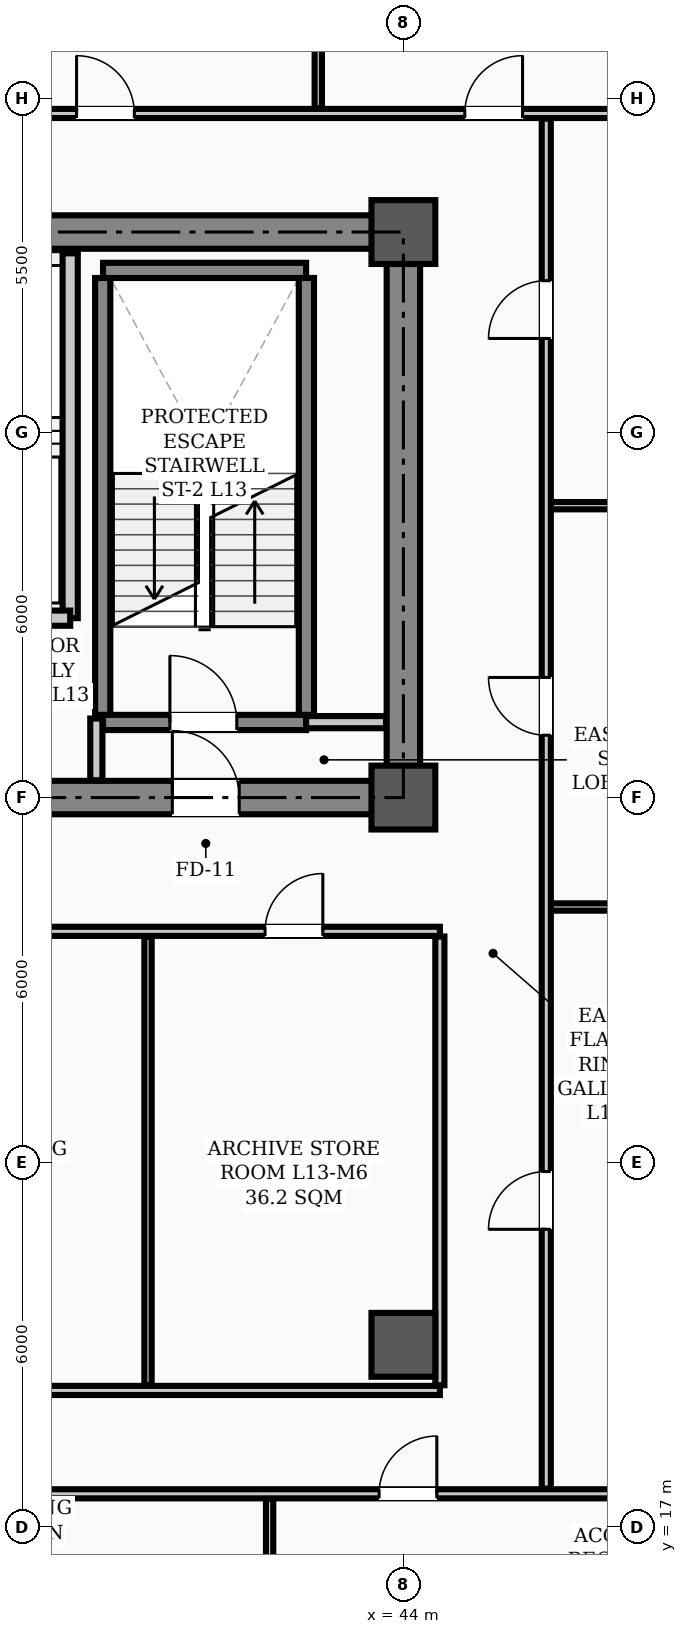
"""IFC4 building model, lengths in metres.
Left out: names, types, materials, properties, quantities, classifications, styles, units other than length and angle.
Written with IfcOpenShell. Run it as: python <this file> out.ifc"""

import sys

from ifc_helpers import new_model, si_unit, direction, frame, frame_2d, origin, origin_2d, place, context, subcontext, project, spatial, rectangle, hollow_rectangle, extrude, element, fill, save


model = new_model("IFC4")
c1 = context("Model", 3, precision=1e-05, world=origin(), true_north=direction((0.0, 1.0)))
c2 = subcontext(c1, "Body", "Model", "MODEL_VIEW")
j1 = project(units=[si_unit("LENGTHUNIT", "METRE"), si_unit("PLANEANGLEUNIT", "RADIAN")], contexts=[c1])
p1 = place(None, origin())
s1 = spatial("IfcSite", under=j1, at=p1, CompositionType="ELEMENT")
p2 = place(p1, origin())
s2 = spatial("IfcBuilding", under=s1, at=p2, CompositionType="ELEMENT")
p3 = place(p2, frame((0.0, 0.0, 53.8)))
s3 = spatial("IfcBuildingStorey", under=s2, at=p3, CompositionType="ELEMENT", Elevation=53.8)
for number, where, z_axis, x_axis in (
    (1, (44.0, 29.0, 0.0), (0.0, 0.0, 1.0), (1.0, 0.0, 0.0)),
    (2, (44.0, 38.3, 0.0), (0.0, 0.0, 1.0), (1.0, 0.0, 0.0)),
    (3, (44.0, 20.0, 0.0), (0.0, 0.0, 1.0), (1.0, 0.0, 0.0)),
):
    element("IfcColumn", number, at=place(p3, frame(where, z_axis=z_axis, x_axis=x_axis)), inside=s3, PredefinedType="COLUMN", context=c2, shape_type="SweptSolid", body=[
        extrude(hollow_rectangle(XDim=1.05, YDim=1.05, WallThickness=0.038, InnerFilletRadius=0.019, OuterFilletRadius=0.057, at=origin_2d()), origin(), (0.0, 0.0, 1.0), 3.9),
    ])
p4 = place(p3, frame((13.5, 29.0, 0.0), z_axis=(0.0, 0.0, 1.0), x_axis=(1.0, 0.0, 0.0)))
e4 = element("IfcWall", 4, at=p4, inside=s3, PredefinedType="SHEAR", context=c2, shape_type="SweptSolid", body=[
    extrude(rectangle(XDim=30.5, YDim=0.55, at=frame_2d((15.25, 0.0))), origin(), (0.0, 0.0, 1.0), 3.72),
])
p5 = place(p4, frame((1.75, 0.0, 0.0)))
e5 = element("IfcOpeningElement", 5, at=p5, cuts=e4, PredefinedType="OPENING", context=c2, shape_type="SweptSolid", body=[
    extrude(rectangle(XDim=1.1, YDim=2.08, at=frame_2d((0.55, 1.04))), frame((0.0, 0.285, 0.0), z_axis=(0.0, -1.0, 0.0), x_axis=(1.0, 0.0, 0.0)), (0.0, 0.0, 1.0), 0.57),
])
p6 = place(p4, frame((26.7, 0.0, 0.0)))
e6 = element("IfcOpeningElement", 6, at=p6, cuts=e4, PredefinedType="OPENING", context=c2, shape_type="SweptSolid", body=[
    extrude(rectangle(XDim=1.1, YDim=2.08, at=frame_2d((0.55, 1.04))), frame((0.0, 0.285, 0.0), z_axis=(0.0, -1.0, 0.0), x_axis=(1.0, 0.0, 0.0)), (0.0, 0.0, 1.0), 0.57),
])
p7 = place(p4, frame((6.8, 0.0, 0.0)))
e7 = element("IfcOpeningElement", 7, at=p7, cuts=e4, PredefinedType="OPENING", context=c2, shape_type="SweptSolid", body=[
    extrude(rectangle(XDim=1.1, YDim=2.08, at=frame_2d((0.55, 1.04))), frame((0.0, 0.285, 0.0), z_axis=(0.0, -1.0, 0.0), x_axis=(1.0, 0.0, 0.0)), (0.0, 0.0, 1.0), 0.57),
])
p8 = place(p4, frame((13.2, 0.0, 0.0)))
e8 = element("IfcOpeningElement", 8, at=p8, cuts=e4, PredefinedType="OPENING", context=c2, shape_type="SweptSolid", body=[
    extrude(rectangle(XDim=1.6, YDim=2.08, at=frame_2d((0.8, 1.04))), frame((0.0, 0.285, 0.0), z_axis=(0.0, -1.0, 0.0), x_axis=(1.0, 0.0, 0.0)), (0.0, 0.0, 1.0), 0.57),
])
p9 = place(p4, frame((19.5, 0.0, 0.0)))
e9 = element("IfcOpeningElement", 9, at=p9, cuts=e4, PredefinedType="OPENING", context=c2, shape_type="SweptSolid", body=[
    extrude(rectangle(XDim=0.9, YDim=2.08, at=frame_2d((0.45, 1.04))), frame((0.0, 0.285, 0.0), z_axis=(0.0, -1.0, 0.0), x_axis=(1.0, 0.0, 0.0)), (0.0, 0.0, 1.0), 0.57),
])
p10 = place(p4, frame((21.55, 0.0, 0.0)))
e10 = element("IfcOpeningElement", 10, at=p10, cuts=e4, PredefinedType="OPENING", context=c2, shape_type="SweptSolid", body=[
    extrude(rectangle(XDim=0.9, YDim=2.08, at=frame_2d((0.45, 1.04))), frame((0.0, 0.285, 0.0), z_axis=(0.0, -1.0, 0.0), x_axis=(1.0, 0.0, 0.0)), (0.0, 0.0, 1.0), 0.57),
])
p11 = place(p3, frame((13.5, 38.3, 0.0), z_axis=(0.0, 0.0, 1.0), x_axis=(1.0, 0.0, 0.0)))
e11 = element("IfcWall", 11, at=p11, inside=s3, PredefinedType="SHEAR", context=c2, shape_type="SweptSolid", body=[
    extrude(rectangle(XDim=30.5, YDim=0.55, at=frame_2d((15.25, 0.0))), origin(), (0.0, 0.0, 1.0), 3.72),
])
p12 = place(p3, frame((44.0, 29.35, 0.0), z_axis=(0.0, 0.0, 1.0), x_axis=(0.0, 1.0, 0.0)))
e12 = element("IfcWall", 12, at=p12, inside=s3, PredefinedType="SHEAR", context=c2, shape_type="SweptSolid", body=[
    extrude(rectangle(XDim=8.6, YDim=0.55, at=frame_2d((4.3, 0.0))), origin(), (0.0, 0.0, 1.0), 3.72),
])
p13 = place(p3, frame((39.06, 30.235, 0.0), z_axis=(0.0, 0.0, 1.0), x_axis=(1.0, 0.0, 0.0)))
e13 = element("IfcWall", 13, at=p13, inside=s3, PredefinedType="STANDARD", context=c2, shape_type="SweptSolid", body=[
    extrude(rectangle(XDim=3.34, YDim=0.25, at=frame_2d((1.67, 0.0))), origin(), (0.0, 0.0, 1.0), 3.72),
])
p14 = place(p13, frame((1.1, 0.0, 0.0)))
e14 = element("IfcOpeningElement", 14, at=p14, cuts=e13, PredefinedType="OPENING", context=c2, shape_type="SweptSolid", body=[
    extrude(rectangle(XDim=1.1, YDim=2.08, at=frame_2d((0.55, 1.04))), frame((0.0, 0.135, 0.0), z_axis=(0.0, -1.0, 0.0), x_axis=(1.0, 0.0, 0.0)), (0.0, 0.0, 1.0), 0.27),
])
p15 = place(p3, frame((39.06, 37.669, 0.0), z_axis=(0.0, 0.0, 1.0), x_axis=(1.0, 0.0, 0.0)))
e15 = element("IfcWall", 15, at=p15, inside=s3, PredefinedType="STANDARD", context=c2, shape_type="SweptSolid", body=[
    extrude(rectangle(XDim=3.34, YDim=0.25, at=frame_2d((1.67, 0.0))), origin(), (0.0, 0.0, 1.0), 3.72),
])
for number, where, z_axis, x_axis in (
    (16, (39.055, 30.36, 0.0), (0.0, 0.0, 1.0), (0.0, 1.0, 0.0)),
    (17, (42.405, 30.36, 0.0), (0.0, 0.0, 1.0), (0.0, 1.0, 0.0)),
):
    element("IfcWall", number, at=place(p3, frame(where, z_axis=z_axis, x_axis=x_axis)), inside=s3, PredefinedType="STANDARD", context=c2, shape_type="SweptSolid", body=[
        extrude(rectangle(XDim=7.184, YDim=0.25, at=frame_2d((3.592, 0.0))), origin(), (0.0, 0.0, 1.0), 3.72),
    ])
p16 = place(p3, frame((38.52, 31.95, 0.0), z_axis=(0.0, 0.0, 1.0), x_axis=(0.0, 1.0, 0.0)))
e18 = element("IfcWall", 18, at=p16, inside=s3, PredefinedType="STANDARD", context=c2, shape_type="SweptSolid", body=[
    extrude(rectangle(XDim=6.0, YDim=0.25, at=frame_2d((3.0, 0.0))), origin(), (0.0, 0.0, 1.0), 3.3),
])
p17 = place(p3, frame((36.62, 31.95, 0.0), z_axis=(0.0, 0.0, 1.0), x_axis=(1.0, 0.0, 0.0)))
e19 = element("IfcWall", 19, at=p17, inside=s3, PredefinedType="STANDARD", context=c2, shape_type="SweptSolid", body=[
    extrude(rectangle(XDim=1.9, YDim=0.25, at=frame_2d((0.95, 0.0))), origin(), (0.0, 0.0, 1.0), 3.48),
])
p18 = place(p3, frame((42.4, 30.24, 0.0), z_axis=(0.0, 0.0, 1.0), x_axis=(1.0, 0.0, 0.0)))
e20 = element("IfcWall", 20, at=p18, inside=s3, PredefinedType="STANDARD", context=c2, shape_type="SweptSolid", body=[
    extrude(rectangle(XDim=1.315, YDim=0.2, at=frame_2d((0.658, 0.0))), origin(), (0.0, 0.0, 1.0), 3.1),
])
p19 = place(p3, frame((12.9, 26.8, 0.0), z_axis=(0.0, 0.0, 1.0), x_axis=(1.0, 0.0, 0.0)))
e21 = element("IfcWall", 21, at=p19, inside=s3, PredefinedType="PARTITIONING", context=c2, shape_type="SweptSolid", body=[
    extrude(rectangle(XDim=31.7, YDim=0.15, at=frame_2d((15.85, 0.0))), origin(), (0.0, 0.0, 1.0), 3.1),
])
p20 = place(p19, frame((13.6, 0.0, 0.0)))
e22 = element("IfcOpeningElement", 22, at=p20, cuts=e21, PredefinedType="OPENING", context=c2, shape_type="SweptSolid", body=[
    extrude(rectangle(XDim=1.6, YDim=2.08, at=frame_2d((0.8, 1.04))), frame((0.0, 0.085, 0.0), z_axis=(0.0, -1.0, 0.0), x_axis=(1.0, 0.0, 0.0)), (0.0, 0.0, 1.0), 0.17),
])
p21 = place(p19, frame((2.475, 0.0, 0.0)))
e23 = element("IfcOpeningElement", 23, at=p21, cuts=e21, PredefinedType="OPENING", context=c2, shape_type="SweptSolid", body=[
    extrude(rectangle(XDim=0.95, YDim=2.08, at=frame_2d((0.475, 1.04))), frame((0.0, 0.085, 0.0), z_axis=(0.0, -1.0, 0.0), x_axis=(1.0, 0.0, 0.0)), (0.0, 0.0, 1.0), 0.17),
])
p22 = place(p19, frame((5.725, 0.0, 0.0)))
e24 = element("IfcOpeningElement", 24, at=p22, cuts=e21, PredefinedType="OPENING", context=c2, shape_type="SweptSolid", body=[
    extrude(rectangle(XDim=0.95, YDim=2.08, at=frame_2d((0.475, 1.04))), frame((0.0, 0.085, 0.0), z_axis=(0.0, -1.0, 0.0), x_axis=(1.0, 0.0, 0.0)), (0.0, 0.0, 1.0), 0.17),
])
p23 = place(p19, frame((8.875, 0.0, 0.0)))
e25 = element("IfcOpeningElement", 25, at=p23, cuts=e21, PredefinedType="OPENING", context=c2, shape_type="SweptSolid", body=[
    extrude(rectangle(XDim=0.95, YDim=2.08, at=frame_2d((0.475, 1.04))), frame((0.0, 0.085, 0.0), z_axis=(0.0, -1.0, 0.0), x_axis=(1.0, 0.0, 0.0)), (0.0, 0.0, 1.0), 0.17),
])
p24 = place(p19, frame((16.075, 0.0, 0.0)))
e26 = element("IfcOpeningElement", 26, at=p24, cuts=e21, PredefinedType="OPENING", context=c2, shape_type="SweptSolid", body=[
    extrude(rectangle(XDim=0.95, YDim=2.08, at=frame_2d((0.475, 1.04))), frame((0.0, 0.085, 0.0), z_axis=(0.0, -1.0, 0.0), x_axis=(1.0, 0.0, 0.0)), (0.0, 0.0, 1.0), 0.17),
])
p25 = place(p19, frame((22.525, 0.0, 0.0)))
e27 = element("IfcOpeningElement", 27, at=p25, cuts=e21, PredefinedType="OPENING", context=c2, shape_type="SweptSolid", body=[
    extrude(rectangle(XDim=0.95, YDim=2.08, at=frame_2d((0.475, 1.04))), frame((0.0, 0.085, 0.0), z_axis=(0.0, -1.0, 0.0), x_axis=(1.0, 0.0, 0.0)), (0.0, 0.0, 1.0), 0.17),
])
p26 = place(p19, frame((28.825, 0.0, 0.0)))
e28 = element("IfcOpeningElement", 28, at=p26, cuts=e21, PredefinedType="OPENING", context=c2, shape_type="SweptSolid", body=[
    extrude(rectangle(XDim=0.95, YDim=2.08, at=frame_2d((0.475, 1.04))), frame((0.0, 0.085, 0.0), z_axis=(0.0, -1.0, 0.0), x_axis=(1.0, 0.0, 0.0)), (0.0, 0.0, 1.0), 0.17),
])
p27 = place(p3, frame((10.16, 17.55, 0.0), z_axis=(0.0, 0.0, 1.0), x_axis=(1.0, 0.0, 0.0)))
e29 = element("IfcWall", 29, at=p27, inside=s3, PredefinedType="PARTITIONING", context=c2, shape_type="SweptSolid", body=[
    extrude(rectangle(XDim=44.68, YDim=0.15, at=frame_2d((22.34, 0.0))), origin(), (0.0, 0.0, 1.0), 3.1),
])
p28 = place(p27, frame((2.64, 0.0, 0.0)))
e30 = element("IfcOpeningElement", 30, at=p28, cuts=e29, PredefinedType="OPENING", context=c2, shape_type="SweptSolid", body=[
    extrude(rectangle(XDim=0.95, YDim=2.08, at=frame_2d((0.475, 1.04))), frame((0.0, 0.085, 0.0), z_axis=(0.0, -1.0, 0.0), x_axis=(1.0, 0.0, 0.0)), (0.0, 0.0, 1.0), 0.17),
])
p29 = place(p27, frame((8.965, 0.0, 0.0)))
e31 = element("IfcOpeningElement", 31, at=p29, cuts=e29, PredefinedType="OPENING", context=c2, shape_type="SweptSolid", body=[
    extrude(rectangle(XDim=0.95, YDim=2.08, at=frame_2d((0.475, 1.04))), frame((0.0, 0.085, 0.0), z_axis=(0.0, -1.0, 0.0), x_axis=(1.0, 0.0, 0.0)), (0.0, 0.0, 1.0), 0.17),
])
p30 = place(p27, frame((23.815, 0.0, 0.0)))
e32 = element("IfcOpeningElement", 32, at=p30, cuts=e29, PredefinedType="OPENING", context=c2, shape_type="SweptSolid", body=[
    extrude(rectangle(XDim=0.95, YDim=2.08, at=frame_2d((0.475, 1.04))), frame((0.0, 0.085, 0.0), z_axis=(0.0, -1.0, 0.0), x_axis=(1.0, 0.0, 0.0)), (0.0, 0.0, 1.0), 0.17),
])
p31 = place(p27, frame((33.44, 0.0, 0.0)))
e33 = element("IfcOpeningElement", 33, at=p31, cuts=e29, PredefinedType="OPENING", context=c2, shape_type="SweptSolid", body=[
    extrude(rectangle(XDim=0.95, YDim=2.08, at=frame_2d((0.475, 1.04))), frame((0.0, 0.085, 0.0), z_axis=(0.0, -1.0, 0.0), x_axis=(1.0, 0.0, 0.0)), (0.0, 0.0, 1.0), 0.17),
])
p32 = place(p3, frame((28.4, 19.25, 0.0), z_axis=(0.0, 0.0, 1.0), x_axis=(1.0, 0.0, 0.0)))
e34 = element("IfcWall", 34, at=p32, inside=s3, PredefinedType="PARTITIONING", context=c2, shape_type="SweptSolid", body=[
    extrude(rectangle(XDim=16.2, YDim=0.15, at=frame_2d((8.1, 0.0))), origin(), (0.0, 0.0, 1.0), 3.1),
])
for number, where, z_axis, x_axis in (
    (35, (46.35, 27.2, 0.0), (0.0, 0.0, 1.0), (1.0, 0.0, 0.0)),
    (36, (46.35, 33.8, 0.0), (0.0, 0.0, 1.0), (1.0, 0.0, 0.0)),
):
    element("IfcWall", number, at=place(p3, frame(where, z_axis=z_axis, x_axis=x_axis)), inside=s3, PredefinedType="PARTITIONING", context=c2, shape_type="SweptSolid", body=[
        extrude(rectangle(XDim=10.84, YDim=0.12, at=frame_2d((5.42, 0.0))), origin(), (0.0, 0.0, 1.0), 3.212),
    ])
p33 = place(p3, frame((7.81, 40.25, 0.0), z_axis=(0.0, 0.0, 1.0), x_axis=(1.0, 0.0, 0.0)))
e37 = element("IfcWall", 37, at=p33, inside=s3, PredefinedType="PARTITIONING", context=c2, shape_type="SweptSolid", body=[
    extrude(rectangle(XDim=49.38, YDim=0.15, at=frame_2d((24.69, 0.0))), origin(), (0.0, 0.0, 1.0), 3.1),
])
p34 = place(p33, frame((3.73, 0.0, 0.0)))
e38 = element("IfcOpeningElement", 38, at=p34, cuts=e37, PredefinedType="OPENING", context=c2, shape_type="SweptSolid", body=[
    extrude(rectangle(XDim=0.95, YDim=2.08, at=frame_2d((0.475, 1.04))), frame((0.0, 0.085, 0.0), z_axis=(0.0, -1.0, 0.0), x_axis=(1.0, 0.0, 0.0)), (0.0, 0.0, 1.0), 0.17),
])
p35 = place(p33, frame((13.815, 0.0, 0.0)))
e39 = element("IfcOpeningElement", 39, at=p35, cuts=e37, PredefinedType="OPENING", context=c2, shape_type="SweptSolid", body=[
    extrude(rectangle(XDim=0.95, YDim=2.08, at=frame_2d((0.475, 1.04))), frame((0.0, 0.085, 0.0), z_axis=(0.0, -1.0, 0.0), x_axis=(1.0, 0.0, 0.0)), (0.0, 0.0, 1.0), 0.17),
])
p36 = place(p33, frame((19.965, 0.0, 0.0)))
e40 = element("IfcOpeningElement", 40, at=p36, cuts=e37, PredefinedType="OPENING", context=c2, shape_type="SweptSolid", body=[
    extrude(rectangle(XDim=0.95, YDim=2.08, at=frame_2d((0.475, 1.04))), frame((0.0, 0.085, 0.0), z_axis=(0.0, -1.0, 0.0), x_axis=(1.0, 0.0, 0.0)), (0.0, 0.0, 1.0), 0.17),
])
p37 = place(p33, frame((30.815, 0.0, 0.0)))
e41 = element("IfcOpeningElement", 41, at=p37, cuts=e37, PredefinedType="OPENING", context=c2, shape_type="SweptSolid", body=[
    extrude(rectangle(XDim=0.95, YDim=2.08, at=frame_2d((0.475, 1.04))), frame((0.0, 0.085, 0.0), z_axis=(0.0, -1.0, 0.0), x_axis=(1.0, 0.0, 0.0)), (0.0, 0.0, 1.0), 0.17),
])
p38 = place(p33, frame((37.2, 0.0, 0.0)))
e42 = element("IfcOpeningElement", 42, at=p38, cuts=e37, PredefinedType="OPENING", context=c2, shape_type="SweptSolid", body=[
    extrude(rectangle(XDim=0.95, YDim=2.08, at=frame_2d((0.475, 1.04))), frame((0.0, 0.085, 0.0), z_axis=(0.0, -1.0, 0.0), x_axis=(1.0, 0.0, 0.0)), (0.0, 0.0, 1.0), 0.17),
])
p39 = place(p3, frame((38.95, 29.285, 0.0), z_axis=(0.0, 0.0, 1.0), x_axis=(0.0, 1.0, 0.0)))
e43 = element("IfcWall", 43, at=p39, inside=s3, PredefinedType="STANDARD", context=c2, shape_type="SweptSolid", body=[
    extrude(rectangle(XDim=1.015, YDim=0.2, at=frame_2d((0.508, 0.0))), origin(), (0.0, 0.0, 1.0), 3.3),
])
p40 = place(p3, frame((46.35, 17.635, 0.0), z_axis=(0.0, 0.0, 1.0), x_axis=(0.0, 1.0, 0.0)))
e44 = element("IfcWall", 44, at=p40, inside=s3, PredefinedType="PARTITIONING", context=c2, shape_type="SweptSolid", body=[
    extrude(rectangle(XDim=22.53, YDim=0.15, at=frame_2d((11.265, 0.0))), origin(), (0.0, 0.0, 1.0), 3.0),
])
p41 = place(p40, frame((4.265, 0.0, 0.0)))
e45 = element("IfcOpeningElement", 45, at=p41, cuts=e44, PredefinedType="OPENING", context=c2, shape_type="SweptSolid", body=[
    extrude(rectangle(XDim=0.95, YDim=2.08, at=frame_2d((0.475, 1.04))), frame((0.0, 0.085, 0.0), z_axis=(0.0, -1.0, 0.0), x_axis=(1.0, 0.0, 0.0)), (0.0, 0.0, 1.0), 0.17),
])
p42 = place(p40, frame((12.39, 0.0, 0.0)))
e46 = element("IfcOpeningElement", 46, at=p42, cuts=e44, PredefinedType="OPENING", context=c2, shape_type="SweptSolid", body=[
    extrude(rectangle(XDim=0.95, YDim=2.08, at=frame_2d((0.475, 1.04))), frame((0.0, 0.085, 0.0), z_axis=(0.0, -1.0, 0.0), x_axis=(1.0, 0.0, 0.0)), (0.0, 0.0, 1.0), 0.17),
])
p43 = place(p40, frame((18.915, 0.0, 0.0)))
e47 = element("IfcOpeningElement", 47, at=p43, cuts=e44, PredefinedType="OPENING", context=c2, shape_type="SweptSolid", body=[
    extrude(rectangle(XDim=0.95, YDim=2.08, at=frame_2d((0.475, 1.04))), frame((0.0, 0.085, 0.0), z_axis=(0.0, -1.0, 0.0), x_axis=(1.0, 0.0, 0.0)), (0.0, 0.0, 1.0), 0.17),
])
p44 = place(p3, frame((44.6, 19.335, 0.0), z_axis=(0.0, 0.0, 1.0), x_axis=(0.0, 1.0, 0.0)))
e48 = element("IfcWall", 48, at=p44, inside=s3, PredefinedType="PARTITIONING", context=c2, shape_type="SweptSolid", body=[
    extrude(rectangle(XDim=7.38, YDim=0.15, at=frame_2d((3.69, 0.0))), origin(), (0.0, 0.0, 1.0), 3.0),
])
p45 = place(p3, frame((41.8, 15.31, 0.0), z_axis=(0.0, 0.0, 1.0), x_axis=(0.0, 1.0, 0.0)))
e49 = element("IfcWall", 49, at=p45, inside=s3, PredefinedType="PARTITIONING", context=c2, shape_type="SweptSolid", body=[
    extrude(rectangle(XDim=2.155, YDim=0.12, at=frame_2d((1.078, 0.0))), origin(), (0.0, 0.0, 1.0), 3.212),
])
p46 = place(p3, frame((39.8, 19.335, 0.0), z_axis=(0.0, 0.0, 1.0), x_axis=(0.0, 1.0, 0.0)))
e50 = element("IfcWall", 50, at=p46, inside=s3, PredefinedType="PARTITIONING", context=c2, shape_type="SweptSolid", body=[
    extrude(rectangle(XDim=7.38, YDim=0.12, at=frame_2d((3.69, 0.0))), origin(), (0.0, 0.0, 1.0), 3.0),
])
p47 = place(p3, frame((42.6, 40.335, 0.0), z_axis=(0.0, 0.0, 1.0), x_axis=(0.0, 1.0, 0.0)))
e51 = element("IfcWall", 51, at=p47, inside=s3, PredefinedType="PARTITIONING", context=c2, shape_type="SweptSolid", body=[
    extrude(rectangle(XDim=6.355, YDim=0.12, at=frame_2d((3.177, 0.0))), origin(), (0.0, 0.0, 1.0), 3.212),
])
p48 = place(p14, origin())
e52 = element("IfcDoor", 52, at=p48, inside=s3, OperationType="SINGLE_SWING_LEFT", PredefinedType="DOOR", context=c2, shape_type="SweptSolid", body=[
    extrude(rectangle(XDim=1.1, YDim=2.08, at=frame_2d((0.55, 1.04))), frame((0.0, 0.025, 0.0), z_axis=(0.0, -1.0, 0.0), x_axis=(1.0, 0.0, 0.0)), (0.0, 0.0, 1.0), 0.05),
])
fill(e14, e52)
p49 = place(p6, origin())
e53 = element("IfcDoor", 53, at=p49, inside=s3, OperationType="SINGLE_SWING_LEFT", PredefinedType="DOOR", context=c2, shape_type="SweptSolid", body=[
    extrude(rectangle(XDim=1.1, YDim=2.08, at=frame_2d((0.55, 1.04))), frame((0.0, 0.025, 0.0), z_axis=(0.0, -1.0, 0.0), x_axis=(1.0, 0.0, 0.0)), (0.0, 0.0, 1.0), 0.05),
])
fill(e6, e53)
p50 = place(p31, origin())
e54 = element("IfcDoor", 54, at=p50, inside=s3, OperationType="SINGLE_SWING_RIGHT", PredefinedType="DOOR", context=c2, shape_type="SweptSolid", body=[
    extrude(rectangle(XDim=0.95, YDim=2.08, at=frame_2d((0.475, 1.04))), frame((0.0, 0.025, 0.0), z_axis=(0.0, -1.0, 0.0), x_axis=(1.0, 0.0, 0.0)), (0.0, 0.0, 1.0), 0.05),
])
fill(e33, e54)
p51 = place(p26, origin())
e55 = element("IfcDoor", 55, at=p51, inside=s3, OperationType="SINGLE_SWING_RIGHT", PredefinedType="DOOR", context=c2, shape_type="SweptSolid", body=[
    extrude(rectangle(XDim=0.95, YDim=2.08, at=frame_2d((0.475, 1.04))), frame((0.0, 0.025, 0.0), z_axis=(0.0, -1.0, 0.0), x_axis=(1.0, 0.0, 0.0)), (0.0, 0.0, 1.0), 0.05),
])
fill(e28, e55)
p52 = place(p41, origin())
e56 = element("IfcDoor", 56, at=p52, inside=s3, OperationType="SINGLE_SWING_LEFT", PredefinedType="DOOR", context=c2, shape_type="SweptSolid", body=[
    extrude(rectangle(XDim=0.95, YDim=2.08, at=frame_2d((0.475, 1.04))), frame((0.0, 0.025, 0.0), z_axis=(0.0, -1.0, 0.0), x_axis=(1.0, 0.0, 0.0)), (0.0, 0.0, 1.0), 0.05),
])
fill(e45, e56)
p53 = place(p42, origin())
e57 = element("IfcDoor", 57, at=p53, inside=s3, OperationType="SINGLE_SWING_RIGHT", PredefinedType="DOOR", context=c2, shape_type="SweptSolid", body=[
    extrude(rectangle(XDim=0.95, YDim=2.08, at=frame_2d((0.475, 1.04))), frame((0.0, 0.025, 0.0), z_axis=(0.0, -1.0, 0.0), x_axis=(1.0, 0.0, 0.0)), (0.0, 0.0, 1.0), 0.05),
])
fill(e46, e57)
p54 = place(p43, origin())
e58 = element("IfcDoor", 58, at=p54, inside=s3, OperationType="SINGLE_SWING_LEFT", PredefinedType="DOOR", context=c2, shape_type="SweptSolid", body=[
    extrude(rectangle(XDim=0.95, YDim=2.08, at=frame_2d((0.475, 1.04))), frame((0.0, 0.025, 0.0), z_axis=(0.0, -1.0, 0.0), x_axis=(1.0, 0.0, 0.0)), (0.0, 0.0, 1.0), 0.05),
])
fill(e47, e58)
p55 = place(p37, origin())
e59 = element("IfcDoor", 59, at=p55, inside=s3, OperationType="SINGLE_SWING_LEFT", PredefinedType="DOOR", context=c2, shape_type="SweptSolid", body=[
    extrude(rectangle(XDim=0.95, YDim=2.08, at=frame_2d((0.475, 1.04))), frame((0.0, 0.025, 0.0), z_axis=(0.0, -1.0, 0.0), x_axis=(1.0, 0.0, 0.0)), (0.0, 0.0, 1.0), 0.05),
])
fill(e41, e59)
p56 = place(p38, origin())
e60 = element("IfcDoor", 60, at=p56, inside=s3, OperationType="SINGLE_SWING_RIGHT", PredefinedType="DOOR", context=c2, shape_type="SweptSolid", body=[
    extrude(rectangle(XDim=0.95, YDim=2.08, at=frame_2d((0.475, 1.04))), frame((0.0, 0.025, 0.0), z_axis=(0.0, -1.0, 0.0), x_axis=(1.0, 0.0, 0.0)), (0.0, 0.0, 1.0), 0.05),
])
fill(e42, e60)
save(model, sys.argv[1])
